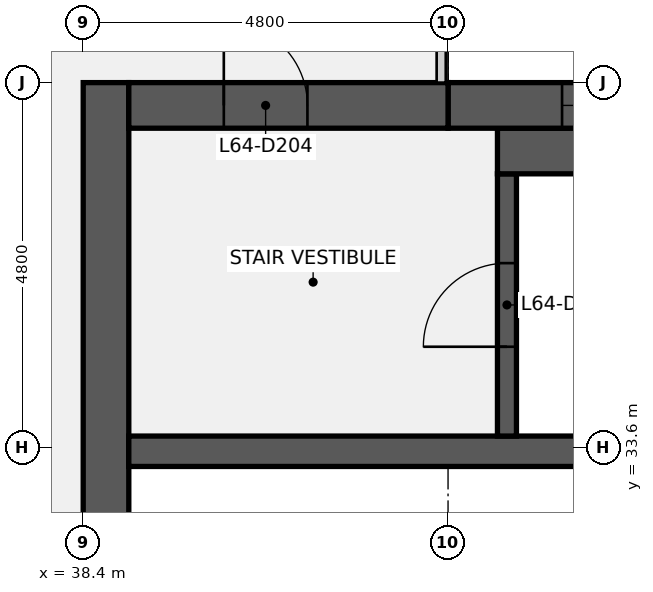
"""IFC4 building model, lengths in metres.
Left out: names, types, materials, properties, quantities, classifications, styles, units other than length and angle.
Written with IfcOpenShell. Run it as: python <this file> out.ifc"""

import sys

from ifc_helpers import new_model, si_unit, direction, frame, frame_2d, origin, place, context, subcontext, project, spatial, rectangle, extrude, element, fill, save


model = new_model("IFC4")
c1 = context("Model", 3, precision=1e-05, world=origin(), true_north=direction((0.0, 1.0)))
c2 = subcontext(c1, "Body", "Model", "MODEL_VIEW")
j1 = project(units=[si_unit("LENGTHUNIT", "METRE"), si_unit("PLANEANGLEUNIT", "RADIAN")], contexts=[c1])
p1 = place(None, origin())
s1 = spatial("IfcSite", under=j1, at=p1, CompositionType="ELEMENT")
p2 = place(p1, origin())
s2 = spatial("IfcBuilding", under=s1, at=p2, CompositionType="ELEMENT")
p3 = place(p2, frame((0.0, 0.0, 294.3)))
s3 = spatial("IfcBuildingStorey", under=s2, at=p3, CompositionType="ELEMENT", Elevation=294.3)
p4 = place(p3, frame((38.7, 9.6, 0.0), z_axis=(0.0, 0.0, 1.0), x_axis=(0.0, 1.0, 0.0)))
e1 = element("IfcWall", 1, at=p4, inside=s3, PredefinedType="SHEAR", context=c2, shape_type="SweptSolid", body=[
    extrude(rectangle(XDim=28.8, YDim=0.6, at=frame_2d((14.4, 0.0))), origin(), (0.0, 0.0, 1.0), 3.84),
])
p5 = place(p4, frame((8.7, 0.0, 0.0)))
e2 = element("IfcOpeningElement", 2, at=p5, cuts=e1, PredefinedType="OPENING", context=c2, shape_type="SweptSolid", body=[
    extrude(rectangle(XDim=1.8, YDim=2.1, at=frame_2d((0.9, 1.05))), frame((0.0, 0.31, 0.0), z_axis=(0.0, -1.0, 0.0), x_axis=(1.0, 0.0, 0.0)), (0.0, 0.0, 1.0), 0.62),
])
p6 = place(p4, frame((18.3, 0.0, 0.0)))
e3 = element("IfcOpeningElement", 3, at=p6, cuts=e1, PredefinedType="OPENING", context=c2, shape_type="SweptSolid", body=[
    extrude(rectangle(XDim=1.8, YDim=2.1, at=frame_2d((0.9, 1.05))), frame((0.0, 0.31, 0.0), z_axis=(0.0, -1.0, 0.0), x_axis=(1.0, 0.0, 0.0)), (0.0, 0.0, 1.0), 0.62),
])
p7 = place(p3, frame((39.0, 33.55, 0.0), z_axis=(0.0, 0.0, 1.0), x_axis=(1.0, 0.0, 0.0)))
e4 = element("IfcWall", 4, at=p7, inside=s3, PredefinedType="SHEAR", context=c2, shape_type="SweptSolid", body=[
    extrude(rectangle(XDim=18.0, YDim=0.4, at=frame_2d((9.0, 0.0))), origin(), (0.0, 0.0, 1.0), 3.84),
])
p8 = place(p3, frame((43.975, 33.75, 0.0), z_axis=(0.0, 0.0, 1.0), x_axis=(0.0, 1.0, 0.0)))
e5 = element("IfcWall", 5, at=p8, inside=s3, PredefinedType="SHEAR", context=c2, shape_type="SweptSolid", body=[
    extrude(rectangle(XDim=3.45, YDim=0.25, at=frame_2d((1.725, 0.0))), origin(), (0.0, 0.0, 1.0), 3.84),
])
p9 = place(p8, frame((1.175, 0.0, 0.0)))
e6 = element("IfcOpeningElement", 6, at=p9, cuts=e5, PredefinedType="OPENING", context=c2, shape_type="SweptSolid", body=[
    extrude(rectangle(XDim=1.1, YDim=2.1, at=frame_2d((0.55, 1.05))), frame((0.0, 0.135, 0.0), z_axis=(0.0, -1.0, 0.0), x_axis=(1.0, 0.0, 0.0)), (0.0, 0.0, 1.0), 0.27),
])
p10 = place(p3, frame((43.85, 37.5, 0.0), z_axis=(0.0, 0.0, 1.0), x_axis=(1.0, 0.0, 0.0)))
e7 = element("IfcWall", 7, at=p10, inside=s3, PredefinedType="SHEAR", context=c2, shape_type="SweptSolid", body=[
    extrude(rectangle(XDim=7.5, YDim=0.6, at=frame_2d((3.75, 0.0))), origin(), (0.0, 0.0, 1.0), 3.84),
])
p11 = place(p3, frame((43.2, 38.1, 0.0), z_axis=(0.0, 0.0, 1.0), x_axis=(1.0, 0.0, 0.0)))
e8 = element("IfcWall", 8, at=p11, inside=s3, PredefinedType="SHEAR", context=c2, shape_type="SweptSolid", body=[
    extrude(rectangle(XDim=13.8, YDim=0.6, at=frame_2d((6.9, 0.0))), origin(), (0.0, 0.0, 1.0), 3.84),
])
p12 = place(p11, frame((6.3, 0.0, 0.9)))
e9 = element("IfcOpeningElement", 9, at=p12, cuts=e8, PredefinedType="OPENING", context=c2, shape_type="SweptSolid", body=[
    extrude(rectangle(XDim=1.8, YDim=1.5, at=frame_2d((0.9, 0.75))), frame((0.0, 0.31, 0.0), z_axis=(0.0, -1.0, 0.0), x_axis=(1.0, 0.0, 0.0)), (0.0, 0.0, 1.0), 0.62),
])
p13 = place(p11, frame((1.5, 0.0, 0.9)))
e10 = element("IfcOpeningElement", 10, at=p13, cuts=e8, PredefinedType="OPENING", context=c2, shape_type="SweptSolid", body=[
    extrude(rectangle(XDim=1.8, YDim=1.5, at=frame_2d((0.9, 0.75))), frame((0.0, 0.31, 0.0), z_axis=(0.0, -1.0, 0.0), x_axis=(1.0, 0.0, 0.0)), (0.0, 0.0, 1.0), 0.62),
])
p14 = place(p3, frame((39.0, 38.1, 0.0), z_axis=(0.0, 0.0, 1.0), x_axis=(1.0, 0.0, 0.0)))
e11 = element("IfcWall", 11, at=p14, inside=s3, PredefinedType="SHEAR", context=c2, shape_type="SweptSolid", body=[
    extrude(rectangle(XDim=4.2, YDim=0.6, at=frame_2d((2.1, 0.0))), origin(), (0.0, 0.0, 1.0), 3.84),
])
p15 = place(p14, frame((1.25, 0.0, 0.0)))
e12 = element("IfcOpeningElement", 12, at=p15, cuts=e11, PredefinedType="OPENING", context=c2, shape_type="SweptSolid", body=[
    extrude(rectangle(XDim=1.1, YDim=2.1, at=frame_2d((0.55, 1.05))), frame((0.0, 0.31, 0.0), z_axis=(0.0, -1.0, 0.0), x_axis=(1.0, 0.0, 0.0)), (0.0, 0.0, 1.0), 0.62),
])
p16 = place(p9, origin())
e13 = element("IfcDoor", 13, at=p16, inside=s3, OperationType="SINGLE_SWING_LEFT", PredefinedType="DOOR", context=c2, shape_type="SweptSolid", body=[
    extrude(rectangle(XDim=1.1, YDim=2.1, at=frame_2d((0.55, 1.05))), frame((0.0, 0.025, 0.0), z_axis=(0.0, -1.0, 0.0), x_axis=(1.0, 0.0, 0.0)), (0.0, 0.0, 1.0), 0.05),
])
fill(e6, e13)
p17 = place(p15, origin())
e14 = element("IfcDoor", 14, at=p17, inside=s3, OperationType="SINGLE_SWING_LEFT", PredefinedType="DOOR", context=c2, shape_type="SweptSolid", body=[
    extrude(rectangle(XDim=1.1, YDim=2.1, at=frame_2d((0.55, 1.05))), frame((0.0, 0.025, 0.0), z_axis=(0.0, -1.0, 0.0), x_axis=(1.0, 0.0, 0.0)), (0.0, 0.0, 1.0), 0.05),
])
fill(e12, e14)
p18 = place(p13, origin())
e15 = element("IfcWindow", 15, at=p18, inside=s3, PartitioningType="SINGLE_PANEL", PredefinedType="WINDOW", context=c2, shape_type="SweptSolid", body=[
    extrude(rectangle(XDim=1.8, YDim=1.5, at=frame_2d((0.9, 0.75))), frame((0.0, 0.03, 0.0), z_axis=(0.0, -1.0, 0.0), x_axis=(1.0, 0.0, 0.0)), (0.0, 0.0, 1.0), 0.06),
])
fill(e10, e15)
save(model, sys.argv[1])
